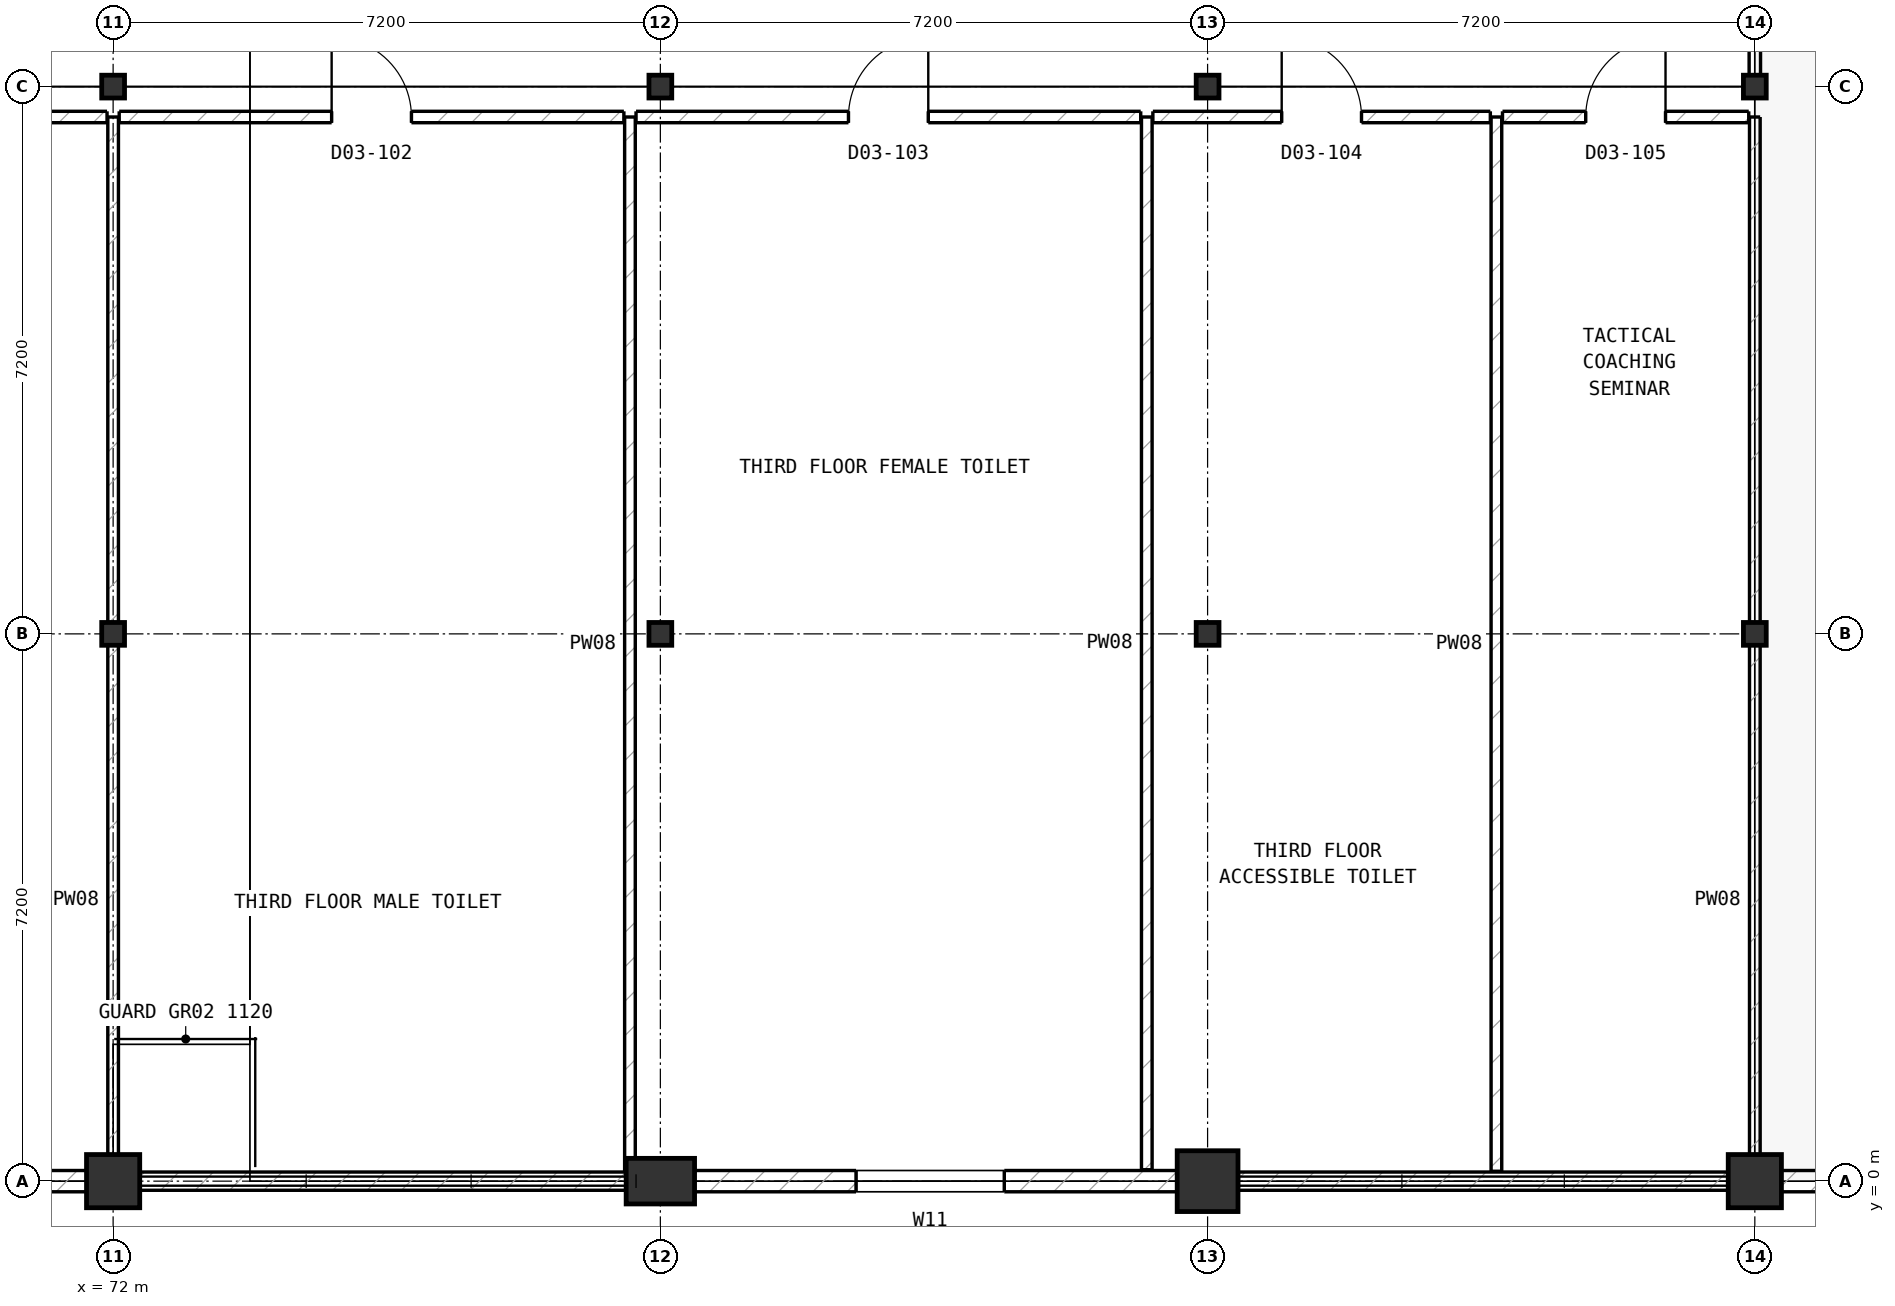
"""IFC4 building model, lengths in metres.
Left out: names, types, materials, properties, quantities, classifications, styles, units other than length and angle.
Written with IfcOpenShell. Run it as: python <this file> out.ifc"""

import sys

from ifc_helpers import new_model, si_unit, direction, frame, frame_2d, origin, origin_2d, place, context, subcontext, project, spatial, rectangle, hollow_rectangle, extrude, element, fill, save


model = new_model("IFC4")
c1 = context("Model", 3, precision=1e-05, world=origin(), true_north=direction((0.0, 1.0)))
c2 = subcontext(c1, "Body", "Model", "MODEL_VIEW")
j1 = project(units=[si_unit("LENGTHUNIT", "METRE"), si_unit("PLANEANGLEUNIT", "RADIAN")], contexts=[c1])
p1 = place(None, origin())
s1 = spatial("IfcSite", under=j1, at=p1, CompositionType="ELEMENT")
p2 = place(p1, origin())
s2 = spatial("IfcBuilding", under=s1, at=p2, CompositionType="ELEMENT")
p3 = place(p2, frame((0.0, 0.0, 16.0)))
s3 = spatial("IfcBuildingStorey", under=s2, at=p3, CompositionType="ELEMENT", Elevation=16.0)
p4 = place(p3, frame((72.0, 0.0, 0.0), z_axis=(0.0, 0.0, 1.0), x_axis=(1.0, 0.0, 0.0)))
e1 = element("IfcColumn", 1, at=p4, inside=s3, PredefinedType="COLUMN", context=c2, shape_type="SweptSolid", body=[
    extrude(rectangle(XDim=0.7, YDim=0.7, at=origin_2d()), origin(), (0.0, 0.0, 1.0), 4.4),
])
for number, where, z_axis, x_axis in (
    (2, (72.0, 7.2, 0.0), (0.0, 0.0, 1.0), (1.0, 0.0, 0.0)),
    (3, (72.0, 14.4, 0.0), (0.0, 0.0, 1.0), (1.0, 0.0, 0.0)),
):
    element("IfcColumn", number, at=place(p3, frame(where, z_axis=z_axis, x_axis=x_axis)), inside=s3, PredefinedType="COLUMN", context=c2, shape_type="SweptSolid", body=[
        extrude(hollow_rectangle(XDim=0.3, YDim=0.3, WallThickness=0.012, at=origin_2d()), origin(), (0.0, 0.0, 1.0), 4.4),
    ])
p5 = place(p3, frame((79.2, 0.0, 0.0), z_axis=(0.0, 0.0, 1.0), x_axis=(1.0, 0.0, 0.0)))
e4 = element("IfcColumn", 4, at=p5, inside=s3, PredefinedType="COLUMN", context=c2, shape_type="SweptSolid", body=[
    extrude(rectangle(XDim=0.6, YDim=0.9, at=origin_2d()), origin(), (0.0, 0.0, 1.0), 4.4),
])
for number, where, z_axis, x_axis in (
    (5, (79.2, 7.2, 0.0), (0.0, 0.0, 1.0), (1.0, 0.0, 0.0)),
    (6, (79.2, 14.4, 0.0), (0.0, 0.0, 1.0), (1.0, 0.0, 0.0)),
):
    element("IfcColumn", number, at=place(p3, frame(where, z_axis=z_axis, x_axis=x_axis)), inside=s3, PredefinedType="COLUMN", context=c2, shape_type="SweptSolid", body=[
        extrude(hollow_rectangle(XDim=0.3, YDim=0.3, WallThickness=0.012, at=origin_2d()), origin(), (0.0, 0.0, 1.0), 4.4),
    ])
p6 = place(p3, frame((86.4, 0.0, 0.0), z_axis=(0.0, 0.0, 1.0), x_axis=(1.0, 0.0, 0.0)))
e7 = element("IfcColumn", 7, at=p6, inside=s3, PredefinedType="COLUMN", context=c2, shape_type="SweptSolid", body=[
    extrude(rectangle(XDim=0.8, YDim=0.8, at=origin_2d()), origin(), (0.0, 0.0, 1.0), 4.4),
])
for number, where, z_axis, x_axis in (
    (8, (86.4, 7.2, 0.0), (0.0, 0.0, 1.0), (1.0, 0.0, 0.0)),
    (9, (86.4, 14.4, 0.0), (0.0, 0.0, 1.0), (1.0, 0.0, 0.0)),
):
    element("IfcColumn", number, at=place(p3, frame(where, z_axis=z_axis, x_axis=x_axis)), inside=s3, PredefinedType="COLUMN", context=c2, shape_type="SweptSolid", body=[
        extrude(hollow_rectangle(XDim=0.3, YDim=0.3, WallThickness=0.012, at=origin_2d()), origin(), (0.0, 0.0, 1.0), 4.4),
    ])
p7 = place(p3, frame((93.6, 0.0, 0.0), z_axis=(0.0, 0.0, 1.0), x_axis=(1.0, 0.0, 0.0)))
e10 = element("IfcColumn", 10, at=p7, inside=s3, PredefinedType="COLUMN", context=c2, shape_type="SweptSolid", body=[
    extrude(rectangle(XDim=0.7, YDim=0.7, at=origin_2d()), origin(), (0.0, 0.0, 1.0), 4.4),
])
for number, where, z_axis, x_axis in (
    (11, (93.6, 7.2, 0.0), (0.0, 0.0, 1.0), (1.0, 0.0, 0.0)),
    (12, (93.6, 14.4, 0.0), (0.0, 0.0, 1.0), (1.0, 0.0, 0.0)),
):
    element("IfcColumn", number, at=place(p3, frame(where, z_axis=z_axis, x_axis=x_axis)), inside=s3, PredefinedType="COLUMN", context=c2, shape_type="SweptSolid", body=[
        extrude(hollow_rectangle(XDim=0.3, YDim=0.3, WallThickness=0.012, at=origin_2d()), origin(), (0.0, 0.0, 1.0), 4.4),
    ])
p8 = place(p3, frame((100.515, 0.0, 0.0), z_axis=(0.0, 0.0, 1.0), x_axis=(-1.0, 0.0, 0.0)))
e13 = element("IfcWall", 13, at=p8, inside=s3, PredefinedType="SOLIDWALL", context=c2, shape_type="SweptSolid", body=[
    extrude(rectangle(XDim=6.58, YDim=0.28, at=frame_2d((3.29, 0.0))), origin(), (0.0, 0.0, 1.0), 3.675),
])
p9 = place(p8, frame((1.94, 0.0, 0.9)))
e14 = element("IfcOpeningElement", 14, at=p9, cuts=e13, PredefinedType="OPENING", context=c2, shape_type="SweptSolid", body=[
    extrude(rectangle(XDim=2.7, YDim=2.1, at=frame_2d((1.35, 1.05))), frame((0.0, 0.15, 0.0), z_axis=(0.0, -1.0, 0.0), x_axis=(1.0, 0.0, 0.0)), (0.0, 0.0, 1.0), 0.3),
])
p10 = place(p3, frame((93.265, 0.0, 0.0), z_axis=(0.0, 0.0, 1.0), x_axis=(-1.0, 0.0, 0.0)))
e15 = element("IfcWall", 15, at=p10, inside=s3, PredefinedType="SOLIDWALL", context=c2, shape_type="SweptSolid", body=[
    extrude(rectangle(XDim=6.48, YDim=0.24, at=frame_2d((3.24, 0.0))), origin(), (0.0, 0.0, 1.0), 0.35),
])
p11 = place(p3, frame((86.015, 0.0, 0.0), z_axis=(0.0, 0.0, 1.0), x_axis=(-1.0, 0.0, 0.0)))
e16 = element("IfcWall", 16, at=p11, inside=s3, PredefinedType="SOLIDWALL", context=c2, shape_type="SweptSolid", body=[
    extrude(rectangle(XDim=6.53, YDim=0.28, at=frame_2d((3.265, 0.0))), origin(), (0.0, 0.0, 1.0), 3.675),
])
p12 = place(p11, frame((2.29, 0.0, 1.0)))
e17 = element("IfcOpeningElement", 17, at=p12, cuts=e16, PredefinedType="OPENING", context=c2, shape_type="SweptSolid", body=[
    extrude(rectangle(XDim=1.95, YDim=1.65, at=frame_2d((0.975, 0.825))), frame((0.0, 0.15, 0.0), z_axis=(0.0, -1.0, 0.0), x_axis=(1.0, 0.0, 0.0)), (0.0, 0.0, 1.0), 0.3),
])
p13 = place(p3, frame((78.915, 0.0, 0.0), z_axis=(0.0, 0.0, 1.0), x_axis=(-1.0, 0.0, 0.0)))
e18 = element("IfcWall", 18, at=p13, inside=s3, PredefinedType="SOLIDWALL", context=c2, shape_type="SweptSolid", body=[
    extrude(rectangle(XDim=6.58, YDim=0.24, at=frame_2d((3.29, 0.0))), origin(), (0.0, 0.0, 1.0), 0.35),
])
p14 = place(p3, frame((71.665, 0.0, 0.0), z_axis=(0.0, 0.0, 1.0), x_axis=(-1.0, 0.0, 0.0)))
e19 = element("IfcWall", 19, at=p14, inside=s3, PredefinedType="SOLIDWALL", context=c2, shape_type="SweptSolid", body=[
    extrude(rectangle(XDim=6.48, YDim=0.28, at=frame_2d((3.24, 0.0))), origin(), (0.0, 0.0, 1.0), 3.675),
])
p15 = place(p14, frame((1.89, 0.0, 0.9)))
e20 = element("IfcOpeningElement", 20, at=p15, cuts=e19, PredefinedType="OPENING", context=c2, shape_type="SweptSolid", body=[
    extrude(rectangle(XDim=2.7, YDim=2.1, at=frame_2d((1.35, 1.05))), frame((0.0, 0.15, 0.0), z_axis=(0.0, -1.0, 0.0), x_axis=(1.0, 0.0, 0.0)), (0.0, 0.0, 1.0), 0.3),
])
p16 = place(p3, frame((72.0, 0.35, 0.0), z_axis=(0.0, 0.0, 1.0), x_axis=(0.0, 1.0, 0.0)))
e21 = element("IfcWall", 21, at=p16, inside=s3, PredefinedType="PARTITIONING", context=c2, shape_type="SweptSolid", body=[
    extrude(rectangle(XDim=6.7, YDim=0.14, at=frame_2d((3.35, 0.0))), origin(), (0.0, 0.0, 1.0), 3.62),
])
p17 = place(p3, frame((72.0, 7.35, 0.0), z_axis=(0.0, 0.0, 1.0), x_axis=(0.0, 1.0, 0.0)))
e22 = element("IfcWall", 22, at=p17, inside=s3, PredefinedType="PARTITIONING", context=c2, shape_type="SweptSolid", body=[
    extrude(rectangle(XDim=6.65, YDim=0.14, at=frame_2d((3.325, 0.0))), origin(), (0.0, 0.0, 1.0), 3.62),
])
p18 = place(p3, frame((78.8, 0.13, 0.0), z_axis=(0.0, 0.0, 1.0), x_axis=(0.0, 1.0, 0.0)))
e23 = element("IfcWall", 23, at=p18, inside=s3, PredefinedType="PARTITIONING", context=c2, shape_type="SweptSolid", body=[
    extrude(rectangle(XDim=13.87, YDim=0.14, at=frame_2d((6.935, 0.0))), origin(), (0.0, 0.0, 1.0), 4.12),
])
p19 = place(p3, frame((85.6, 0.15, 0.0), z_axis=(0.0, 0.0, 1.0), x_axis=(0.0, 1.0, 0.0)))
e24 = element("IfcWall", 24, at=p19, inside=s3, PredefinedType="PARTITIONING", context=c2, shape_type="SweptSolid", body=[
    extrude(rectangle(XDim=13.85, YDim=0.14, at=frame_2d((6.925, 0.0))), origin(), (0.0, 0.0, 1.0), 4.12),
])
p20 = place(p3, frame((90.2, 0.13, 0.0), z_axis=(0.0, 0.0, 1.0), x_axis=(0.0, 1.0, 0.0)))
e25 = element("IfcWall", 25, at=p20, inside=s3, PredefinedType="PARTITIONING", context=c2, shape_type="SweptSolid", body=[
    extrude(rectangle(XDim=13.87, YDim=0.14, at=frame_2d((6.935, 0.0))), origin(), (0.0, 0.0, 1.0), 4.12),
])
p21 = place(p3, frame((93.6, 0.35, 0.0), z_axis=(0.0, 0.0, 1.0), x_axis=(0.0, 1.0, 0.0)))
e26 = element("IfcWall", 26, at=p21, inside=s3, PredefinedType="PARTITIONING", context=c2, shape_type="SweptSolid", body=[
    extrude(rectangle(XDim=6.7, YDim=0.14, at=frame_2d((3.35, 0.0))), origin(), (0.0, 0.0, 1.0), 3.62),
])
p22 = place(p3, frame((93.6, 7.35, 0.0), z_axis=(0.0, 0.0, 1.0), x_axis=(0.0, 1.0, 0.0)))
e27 = element("IfcWall", 27, at=p22, inside=s3, PredefinedType="PARTITIONING", context=c2, shape_type="SweptSolid", body=[
    extrude(rectangle(XDim=6.65, YDim=0.14, at=frame_2d((3.325, 0.0))), origin(), (0.0, 0.0, 1.0), 3.62),
])
p23 = place(p3, frame((93.6, 14.55, 0.0), z_axis=(0.0, 0.0, 1.0), x_axis=(0.0, 1.0, 0.0)))
e28 = element("IfcWall", 28, at=p23, inside=s3, PredefinedType="PARTITIONING", context=c2, shape_type="SweptSolid", body=[
    extrude(rectangle(XDim=3.24, YDim=0.15, at=frame_2d((1.62, 0.0))), origin(), (0.0, 0.0, 1.0), 3.62),
])
p24 = place(p23, frame((0.77, 0.0, 0.0)))
e29 = element("IfcOpeningElement", 29, at=p24, cuts=e28, PredefinedType="OPENING", context=c2, shape_type="SweptSolid", body=[
    extrude(rectangle(XDim=1.7, YDim=2.3, at=frame_2d((0.85, 1.15))), frame((0.0, 0.085, 0.0), z_axis=(0.0, -1.0, 0.0), x_axis=(1.0, 0.0, 0.0)), (0.0, 0.0, 1.0), 0.17),
])
p25 = place(p3, frame((64.87, 14.0, 0.0), z_axis=(0.0, 0.0, 1.0), x_axis=(1.0, 0.0, 0.0)))
e30 = element("IfcWall", 30, at=p25, inside=s3, PredefinedType="PARTITIONING", context=c2, shape_type="SweptSolid", body=[
    extrude(rectangle(XDim=7.05, YDim=0.15, at=frame_2d((3.525, 0.0))), origin(), (0.0, 0.0, 1.0), 4.12),
])
p26 = place(p25, frame((3.0, 0.0, 0.0)))
e31 = element("IfcOpeningElement", 31, at=p26, cuts=e30, PredefinedType="OPENING", context=c2, shape_type="SweptSolid", body=[
    extrude(rectangle(XDim=1.05, YDim=2.15, at=frame_2d((0.525, 1.075))), frame((0.0, 0.085, 0.0), z_axis=(0.0, -1.0, 0.0), x_axis=(1.0, 0.0, 0.0)), (0.0, 0.0, 1.0), 0.17),
])
p27 = place(p3, frame((72.08, 14.0, 0.0), z_axis=(0.0, 0.0, 1.0), x_axis=(1.0, 0.0, 0.0)))
e32 = element("IfcWall", 32, at=p27, inside=s3, PredefinedType="PARTITIONING", context=c2, shape_type="SweptSolid", body=[
    extrude(rectangle(XDim=6.64, YDim=0.15, at=frame_2d((3.32, 0.0))), origin(), (0.0, 0.0, 1.0), 4.12),
])
p28 = place(p27, frame((2.795, 0.0, 0.0)))
e33 = element("IfcOpeningElement", 33, at=p28, cuts=e32, PredefinedType="OPENING", context=c2, shape_type="SweptSolid", body=[
    extrude(rectangle(XDim=1.05, YDim=2.15, at=frame_2d((0.525, 1.075))), frame((0.0, 0.085, 0.0), z_axis=(0.0, -1.0, 0.0), x_axis=(1.0, 0.0, 0.0)), (0.0, 0.0, 1.0), 0.17),
])
p29 = place(p3, frame((78.88, 14.0, 0.0), z_axis=(0.0, 0.0, 1.0), x_axis=(1.0, 0.0, 0.0)))
e34 = element("IfcWall", 34, at=p29, inside=s3, PredefinedType="PARTITIONING", context=c2, shape_type="SweptSolid", body=[
    extrude(rectangle(XDim=6.64, YDim=0.15, at=frame_2d((3.32, 0.0))), origin(), (0.0, 0.0, 1.0), 4.12),
])
p30 = place(p29, frame((2.795, 0.0, 0.0)))
e35 = element("IfcOpeningElement", 35, at=p30, cuts=e34, PredefinedType="OPENING", context=c2, shape_type="SweptSolid", body=[
    extrude(rectangle(XDim=1.05, YDim=2.15, at=frame_2d((0.525, 1.075))), frame((0.0, 0.085, 0.0), z_axis=(0.0, -1.0, 0.0), x_axis=(1.0, 0.0, 0.0)), (0.0, 0.0, 1.0), 0.17),
])
p31 = place(p3, frame((85.68, 14.0, 0.0), z_axis=(0.0, 0.0, 1.0), x_axis=(1.0, 0.0, 0.0)))
e36 = element("IfcWall", 36, at=p31, inside=s3, PredefinedType="PARTITIONING", context=c2, shape_type="SweptSolid", body=[
    extrude(rectangle(XDim=4.44, YDim=0.15, at=frame_2d((2.22, 0.0))), origin(), (0.0, 0.0, 1.0), 4.12),
])
p32 = place(p31, frame((1.695, 0.0, 0.0)))
e37 = element("IfcOpeningElement", 37, at=p32, cuts=e36, PredefinedType="OPENING", context=c2, shape_type="SweptSolid", body=[
    extrude(rectangle(XDim=1.05, YDim=2.15, at=frame_2d((0.525, 1.075))), frame((0.0, 0.085, 0.0), z_axis=(0.0, -1.0, 0.0), x_axis=(1.0, 0.0, 0.0)), (0.0, 0.0, 1.0), 0.17),
])
p33 = place(p3, frame((90.28, 14.0, 0.0), z_axis=(0.0, 0.0, 1.0), x_axis=(1.0, 0.0, 0.0)))
e38 = element("IfcWall", 38, at=p33, inside=s3, PredefinedType="PARTITIONING", context=c2, shape_type="SweptSolid", body=[
    extrude(rectangle(XDim=3.24, YDim=0.15, at=frame_2d((1.62, 0.0))), origin(), (0.0, 0.0, 1.0), 4.12),
])
p34 = place(p33, frame((1.095, 0.0, 0.0)))
e39 = element("IfcOpeningElement", 39, at=p34, cuts=e38, PredefinedType="OPENING", context=c2, shape_type="SweptSolid", body=[
    extrude(rectangle(XDim=1.05, YDim=2.15, at=frame_2d((0.525, 1.075))), frame((0.0, 0.085, 0.0), z_axis=(0.0, -1.0, 0.0), x_axis=(1.0, 0.0, 0.0)), (0.0, 0.0, 1.0), 0.17),
])
p35 = place(p12, origin())
e40 = element("IfcWindow", 40, at=p35, inside=s3, PartitioningType="SINGLE_PANEL", PredefinedType="WINDOW", context=c2, shape_type="SweptSolid", body=[
    extrude(rectangle(XDim=1.95, YDim=1.65, at=frame_2d((0.975, 0.825))), frame((0.0, 0.03, 0.0), z_axis=(0.0, -1.0, 0.0), x_axis=(1.0, 0.0, 0.0)), (0.0, 0.0, 1.0), 0.06),
])
fill(e17, e40)
p36 = place(p28, origin())
e41 = element("IfcDoor", 41, at=p36, inside=s3, OperationType="SINGLE_SWING_LEFT", PredefinedType="DOOR", context=c2, shape_type="SweptSolid", body=[
    extrude(rectangle(XDim=1.05, YDim=2.15, at=frame_2d((0.525, 1.075))), frame((0.0, 0.025, 0.0), z_axis=(0.0, -1.0, 0.0), x_axis=(1.0, 0.0, 0.0)), (0.0, 0.0, 1.0), 0.05),
])
fill(e33, e41)
p37 = place(p30, origin())
e42 = element("IfcDoor", 42, at=p37, inside=s3, OperationType="SINGLE_SWING_RIGHT", PredefinedType="DOOR", context=c2, shape_type="SweptSolid", body=[
    extrude(rectangle(XDim=1.05, YDim=2.15, at=frame_2d((0.525, 1.075))), frame((0.0, 0.025, 0.0), z_axis=(0.0, -1.0, 0.0), x_axis=(1.0, 0.0, 0.0)), (0.0, 0.0, 1.0), 0.05),
])
fill(e35, e42)
p38 = place(p32, origin())
e43 = element("IfcDoor", 43, at=p38, inside=s3, OperationType="SINGLE_SWING_LEFT", PredefinedType="DOOR", context=c2, shape_type="SweptSolid", body=[
    extrude(rectangle(XDim=1.05, YDim=2.15, at=frame_2d((0.525, 1.075))), frame((0.0, 0.025, 0.0), z_axis=(0.0, -1.0, 0.0), x_axis=(1.0, 0.0, 0.0)), (0.0, 0.0, 1.0), 0.05),
])
fill(e37, e43)
p39 = place(p34, origin())
e44 = element("IfcDoor", 44, at=p39, inside=s3, OperationType="SINGLE_SWING_RIGHT", PredefinedType="DOOR", context=c2, shape_type="SweptSolid", body=[
    extrude(rectangle(XDim=1.05, YDim=2.15, at=frame_2d((0.525, 1.075))), frame((0.0, 0.025, 0.0), z_axis=(0.0, -1.0, 0.0), x_axis=(1.0, 0.0, 0.0)), (0.0, 0.0, 1.0), 0.05),
])
fill(e39, e44)
save(model, sys.argv[1])
